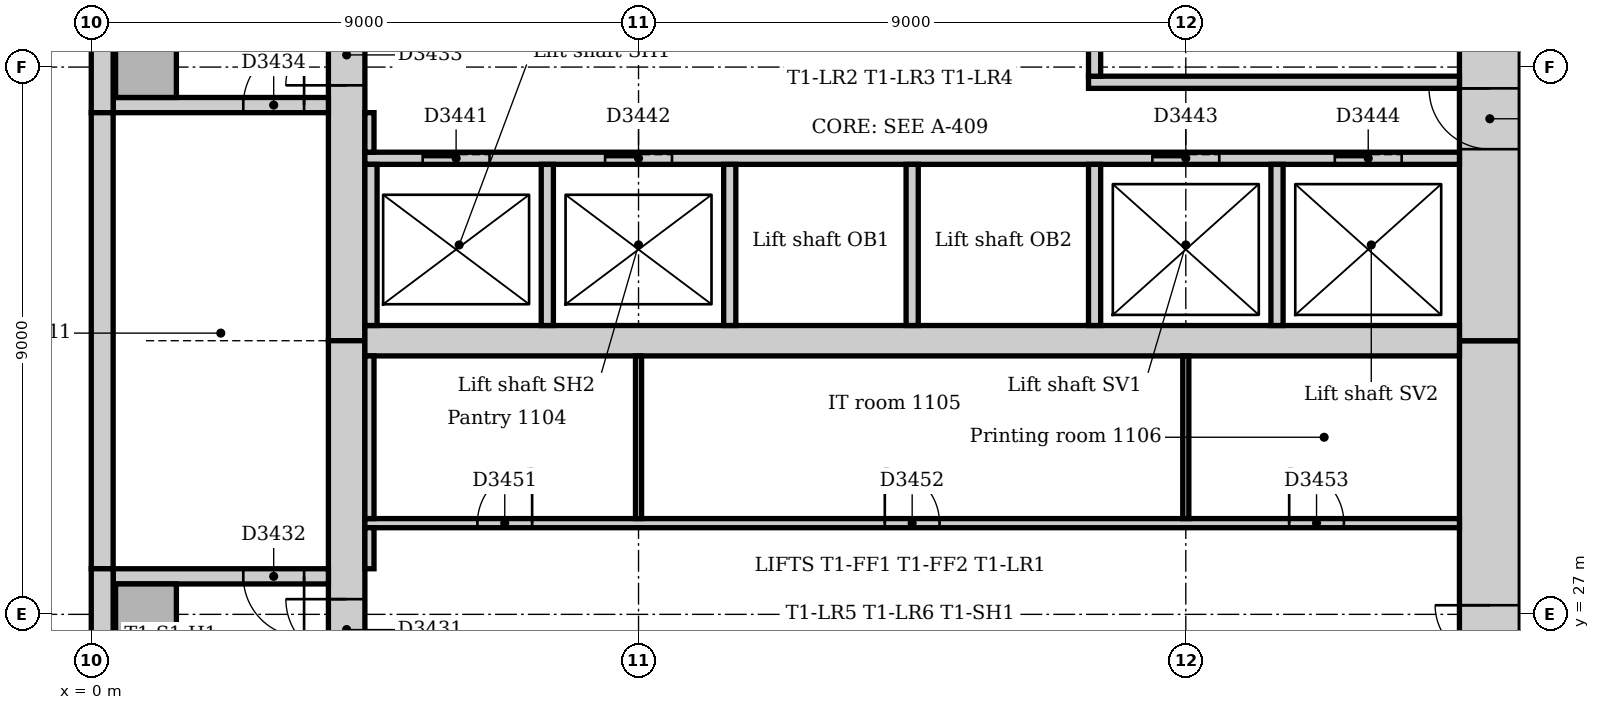
"""IFC4 building model, lengths in metres.
Left out: names, types, materials, properties, quantities, classifications, styles, units other than length and angle.
Written with IfcOpenShell. Run it as: python <this file> out.ifc"""

import sys

from ifc_helpers import new_model, si_unit, direction, frame, frame_2d, origin, origin_2d, place, context, subcontext, project, spatial, rectangle, extrude, element, fill, save


model = new_model("IFC4")
c1 = context("Model", 3, precision=1e-05, world=origin(), true_north=direction((0.0, 1.0)))
c2 = subcontext(c1, "Body", "Model", "MODEL_VIEW")
j1 = project(units=[si_unit("LENGTHUNIT", "METRE"), si_unit("PLANEANGLEUNIT", "RADIAN")], contexts=[c1])
p1 = place(None, origin())
s1 = spatial("IfcSite", under=j1, at=p1, CompositionType="ELEMENT")
p2 = place(p1, origin())
s2 = spatial("IfcBuilding", under=s1, at=p2, CompositionType="ELEMENT")
p3 = place(p2, frame((0.0, 0.0, 51.0)))
s3 = spatial("IfcBuildingStorey", under=s2, at=p3, CompositionType="ELEMENT", Elevation=51.0)
p4 = place(p3, frame((23.0, 21.0, 0.0), z_axis=(0.0, 0.0, 1.0), x_axis=(0.0, 1.0, 0.0)))
e1 = element("IfcWall", 1, at=p4, inside=s3, PredefinedType="SOLIDWALL", context=c2, shape_type="SweptSolid", body=[
    extrude(rectangle(XDim=10.5, YDim=1.0, at=frame_2d((5.25, 0.0))), origin(), (0.0, 0.0, 1.0), 4.0),
])
p5 = place(p4, frame((4.35, 0.0, 0.0)))
e2 = element("IfcOpeningElement", 2, at=p5, cuts=e1, PredefinedType="OPENING", context=c2, shape_type="SweptSolid", body=[
    extrude(rectangle(XDim=1.8, YDim=2.1, at=frame_2d((0.9, 1.05))), frame((0.0, 0.51, 0.0), z_axis=(0.0, -1.0, 0.0), x_axis=(1.0, 0.0, 0.0)), (0.0, 0.0, 1.0), 1.02),
])
p6 = place(p3, frame((23.0, 31.5, 0.0), z_axis=(0.0, 0.0, 1.0), x_axis=(0.0, 1.0, 0.0)))
e3 = element("IfcWall", 3, at=p6, inside=s3, PredefinedType="SOLIDWALL", context=c2, shape_type="SweptSolid", body=[
    extrude(rectangle(XDim=10.5, YDim=1.0, at=frame_2d((5.25, 0.0))), origin(), (0.0, 0.0, 1.0), 4.0),
])
p7 = place(p6, frame((3.15, 0.0, 0.0)))
e4 = element("IfcOpeningElement", 4, at=p7, cuts=e3, PredefinedType="OPENING", context=c2, shape_type="SweptSolid", body=[
    extrude(rectangle(XDim=1.0, YDim=2.1, at=frame_2d((0.5, 1.05))), frame((0.0, 0.51, 0.0), z_axis=(0.0, -1.0, 0.0), x_axis=(1.0, 0.0, 0.0)), (0.0, 0.0, 1.0), 1.02),
])
p8 = place(p6, frame((5.2, 0.0, 0.0)))
e5 = element("IfcOpeningElement", 5, at=p8, cuts=e3, PredefinedType="OPENING", context=c2, shape_type="SweptSolid", body=[
    extrude(rectangle(XDim=1.0, YDim=2.1, at=frame_2d((0.5, 1.05))), frame((0.0, 0.51, 0.0), z_axis=(0.0, -1.0, 0.0), x_axis=(1.0, 0.0, 0.0)), (0.0, 0.0, 1.0), 1.02),
])
p9 = place(p3, frame((4.2, 42.0, 0.0), z_axis=(0.0, 0.0, 1.0), x_axis=(0.0, -1.0, 0.0)))
e6 = element("IfcWall", 6, at=p9, inside=s3, PredefinedType="SOLIDWALL", context=c2, shape_type="SweptSolid", body=[
    extrude(rectangle(XDim=10.5, YDim=0.6, at=frame_2d((5.25, 0.0))), origin(), (0.0, 0.0, 1.0), 4.0),
])
p10 = place(p9, frame((5.3, 0.0, 0.0)))
e7 = element("IfcOpeningElement", 7, at=p10, cuts=e6, PredefinedType="OPENING", context=c2, shape_type="SweptSolid", body=[
    extrude(rectangle(XDim=1.0, YDim=2.1, at=frame_2d((0.5, 1.05))), frame((0.0, 0.31, 0.0), z_axis=(0.0, -1.0, 0.0), x_axis=(1.0, 0.0, 0.0)), (0.0, 0.0, 1.0), 0.62),
])
p11 = place(p3, frame((4.2, 31.5, 0.0), z_axis=(0.0, 0.0, 1.0), x_axis=(0.0, -1.0, 0.0)))
e8 = element("IfcWall", 8, at=p11, inside=s3, PredefinedType="SOLIDWALL", context=c2, shape_type="SweptSolid", body=[
    extrude(rectangle(XDim=10.5, YDim=0.6, at=frame_2d((5.25, 0.0))), origin(), (0.0, 0.0, 1.0), 4.0),
])
p12 = place(p11, frame((4.25, 0.0, 0.0)))
e9 = element("IfcOpeningElement", 9, at=p12, cuts=e8, PredefinedType="OPENING", context=c2, shape_type="SweptSolid", body=[
    extrude(rectangle(XDim=1.0, YDim=2.1, at=frame_2d((0.5, 1.05))), frame((0.0, 0.31, 0.0), z_axis=(0.0, -1.0, 0.0), x_axis=(1.0, 0.0, 0.0)), (0.0, 0.0, 1.0), 0.62),
])
p13 = place(p3, frame((4.5, 31.5, 0.0), z_axis=(0.0, 0.0, 1.0), x_axis=(1.0, 0.0, 0.0)))
e10 = element("IfcWall", 10, at=p13, inside=s3, PredefinedType="SOLIDWALL", context=c2, shape_type="SweptSolid", body=[
    extrude(rectangle(XDim=18.0, YDim=0.5, at=frame_2d((9.0, 0.0))), origin(), (0.0, 0.0, 1.0), 4.0),
])
p14 = place(p3, frame((3.9, 27.625, 0.0), z_axis=(0.0, 0.0, 1.0), x_axis=(-1.0, 0.0, 0.0)))
e11 = element("IfcWall", 11, at=p14, inside=s3, PredefinedType="SOLIDWALL", context=c2, shape_type="SweptSolid", body=[
    extrude(rectangle(XDim=3.54, YDim=0.25, at=frame_2d((1.77, 0.0))), origin(), (0.0, 0.0, 1.0), 4.0),
])
p15 = place(p14, frame((0.4, 0.0, 0.0)))
e12 = element("IfcOpeningElement", 12, at=p15, cuts=e11, PredefinedType="OPENING", context=c2, shape_type="SweptSolid", body=[
    extrude(rectangle(XDim=1.0, YDim=2.1, at=frame_2d((0.5, 1.05))), frame((0.0, 0.135, 0.0), z_axis=(0.0, -1.0, 0.0), x_axis=(1.0, 0.0, 0.0)), (0.0, 0.0, 1.0), 0.27),
])
p16 = place(p3, frame((0.36, 35.375, 0.0), z_axis=(0.0, 0.0, 1.0), x_axis=(1.0, 0.0, 0.0)))
e13 = element("IfcWall", 13, at=p16, inside=s3, PredefinedType="SOLIDWALL", context=c2, shape_type="SweptSolid", body=[
    extrude(rectangle(XDim=3.54, YDim=0.25, at=frame_2d((1.77, 0.0))), origin(), (0.0, 0.0, 1.0), 4.0),
])
p17 = place(p16, frame((2.14, 0.0, 0.0)))
e14 = element("IfcOpeningElement", 14, at=p17, cuts=e13, PredefinedType="OPENING", context=c2, shape_type="SweptSolid", body=[
    extrude(rectangle(XDim=1.0, YDim=2.1, at=frame_2d((0.5, 1.05))), frame((0.0, 0.135, 0.0), z_axis=(0.0, -1.0, 0.0), x_axis=(1.0, 0.0, 0.0)), (0.0, 0.0, 1.0), 0.27),
])
for number, where, z_axis, x_axis in (
    (15, (0.9, 27.0, 0.0), (0.0, 0.0, 1.0), (1.0, 0.0, 0.0)),
    (16, (0.9, 36.0, 0.0), (0.0, 0.0, 1.0), (1.0, 0.0, 0.0)),
):
    element("IfcColumn", number, at=place(p3, frame(where, z_axis=z_axis, x_axis=x_axis)), inside=s3, PredefinedType="COLUMN", context=c2, shape_type="SweptSolid", body=[
        extrude(rectangle(XDim=1.0, YDim=1.0, at=origin_2d()), origin(), (0.0, 0.0, 1.0), 4.0),
    ])
p18 = place(p3, frame((0.18, 40.757, 0.0), z_axis=(0.0, 0.0, 1.0), x_axis=(0.0, -1.0, 0.0)))
e17 = element("IfcWall", 17, at=p18, inside=s3, PredefinedType="STANDARD", context=c2, shape_type="SweptSolid", body=[
    extrude(rectangle(XDim=5.507, YDim=0.36, at=frame_2d((2.754, 0.0))), origin(), (0.0, 0.0, 1.0), 3.85),
])
p19 = place(p3, frame((0.18, 35.25, 0.0), z_axis=(0.0, 0.0, 1.0), x_axis=(0.0, -1.0, 0.0)))
e18 = element("IfcWall", 18, at=p19, inside=s3, PredefinedType="STANDARD", context=c2, shape_type="SweptSolid", body=[
    extrude(rectangle(XDim=7.5, YDim=0.36, at=frame_2d((3.75, 0.0))), origin(), (0.0, 0.0, 1.0), 3.85),
])
p20 = place(p3, frame((0.18, 27.75, 0.0), z_axis=(0.0, 0.0, 1.0), x_axis=(0.0, -1.0, 0.0)))
e19 = element("IfcWall", 19, at=p20, inside=s3, PredefinedType="STANDARD", context=c2, shape_type="SweptSolid", body=[
    extrude(rectangle(XDim=6.75, YDim=0.36, at=frame_2d((3.375, 0.0))), origin(), (0.0, 0.0, 1.0), 3.85),
])
p21 = place(p3, frame((16.4, 35.75, 0.0), z_axis=(0.0, 0.0, 1.0), x_axis=(1.0, 0.0, 0.0)))
e20 = element("IfcWall", 20, at=p21, inside=s3, PredefinedType="PARTITIONING", context=c2, shape_type="SweptSolid", body=[
    extrude(rectangle(XDim=6.1, YDim=0.2, at=frame_2d((3.05, 0.0))), origin(), (0.0, 0.0, 1.0), 3.85),
])
p22 = place(p3, frame((16.5, 35.85, 0.0), z_axis=(0.0, 0.0, 1.0), x_axis=(0.0, 1.0, 0.0)))
e21 = element("IfcWall", 21, at=p22, inside=s3, PredefinedType="PARTITIONING", context=c2, shape_type="SweptSolid", body=[
    extrude(rectangle(XDim=2.55, YDim=0.2, at=frame_2d((1.275, 0.0))), origin(), (0.0, 0.0, 1.0), 3.85),
])
p23 = place(p3, frame((4.5, 34.5, 0.0), z_axis=(0.0, 0.0, 1.0), x_axis=(1.0, 0.0, 0.0)))
e22 = element("IfcWall", 22, at=p23, inside=s3, PredefinedType="PARTITIONING", context=c2, shape_type="SweptSolid", body=[
    extrude(rectangle(XDim=18.0, YDim=0.2, at=frame_2d((9.0, 0.0))), origin(), (0.0, 0.0, 1.0), 3.85),
])
p24 = place(p23, frame((0.95, 0.0, 0.0)))
e23 = element("IfcOpeningElement", 23, at=p24, cuts=e22, PredefinedType="OPENING", context=c2, shape_type="SweptSolid", body=[
    extrude(rectangle(XDim=1.1, YDim=2.1, at=frame_2d((0.55, 1.05))), frame((0.0, 0.11, 0.0), z_axis=(0.0, -1.0, 0.0), x_axis=(1.0, 0.0, 0.0)), (0.0, 0.0, 1.0), 0.22),
])
p25 = place(p23, frame((3.95, 0.0, 0.0)))
e24 = element("IfcOpeningElement", 24, at=p25, cuts=e22, PredefinedType="OPENING", context=c2, shape_type="SweptSolid", body=[
    extrude(rectangle(XDim=1.1, YDim=2.1, at=frame_2d((0.55, 1.05))), frame((0.0, 0.11, 0.0), z_axis=(0.0, -1.0, 0.0), x_axis=(1.0, 0.0, 0.0)), (0.0, 0.0, 1.0), 0.22),
])
p26 = place(p23, frame((12.95, 0.0, 0.0)))
e25 = element("IfcOpeningElement", 25, at=p26, cuts=e22, PredefinedType="OPENING", context=c2, shape_type="SweptSolid", body=[
    extrude(rectangle(XDim=1.1, YDim=2.1, at=frame_2d((0.55, 1.05))), frame((0.0, 0.11, 0.0), z_axis=(0.0, -1.0, 0.0), x_axis=(1.0, 0.0, 0.0)), (0.0, 0.0, 1.0), 0.22),
])
p27 = place(p23, frame((15.95, 0.0, 0.0)))
e26 = element("IfcOpeningElement", 26, at=p27, cuts=e22, PredefinedType="OPENING", context=c2, shape_type="SweptSolid", body=[
    extrude(rectangle(XDim=1.1, YDim=2.1, at=frame_2d((0.55, 1.05))), frame((0.0, 0.11, 0.0), z_axis=(0.0, -1.0, 0.0), x_axis=(1.0, 0.0, 0.0)), (0.0, 0.0, 1.0), 0.22),
])
for number, where, z_axis, x_axis in (
    (27, (4.6, 31.75, 0.0), (0.0, 0.0, 1.0), (0.0, 1.0, 0.0)),
    (28, (7.5, 31.75, 0.0), (0.0, 0.0, 1.0), (0.0, 1.0, 0.0)),
    (29, (10.5, 31.75, 0.0), (0.0, 0.0, 1.0), (0.0, 1.0, 0.0)),
    (30, (13.5, 31.75, 0.0), (0.0, 0.0, 1.0), (0.0, 1.0, 0.0)),
    (31, (16.5, 31.75, 0.0), (0.0, 0.0, 1.0), (0.0, 1.0, 0.0)),
    (32, (19.5, 31.75, 0.0), (0.0, 0.0, 1.0), (0.0, 1.0, 0.0)),
):
    element("IfcWall", number, at=place(p3, frame(where, z_axis=z_axis, x_axis=x_axis)), inside=s3, PredefinedType="PARTITIONING", context=c2, shape_type="SweptSolid", body=[
        extrude(rectangle(XDim=2.65, YDim=0.2, at=frame_2d((1.325, 0.0))), origin(), (0.0, 0.0, 1.0), 3.85),
    ])
p28 = place(p3, frame((4.5, 28.5, 0.0), z_axis=(0.0, 0.0, 1.0), x_axis=(1.0, 0.0, 0.0)))
e33 = element("IfcWall", 33, at=p28, inside=s3, PredefinedType="PARTITIONING", context=c2, shape_type="SweptSolid", body=[
    extrude(rectangle(XDim=18.0, YDim=0.15, at=frame_2d((9.0, 0.0))), origin(), (0.0, 0.0, 1.0), 3.85),
])
p29 = place(p28, frame((1.85, 0.0, 0.0)))
e34 = element("IfcOpeningElement", 34, at=p29, cuts=e33, PredefinedType="OPENING", context=c2, shape_type="SweptSolid", body=[
    extrude(rectangle(XDim=0.9, YDim=2.1, at=frame_2d((0.45, 1.05))), frame((0.0, 0.085, 0.0), z_axis=(0.0, -1.0, 0.0), x_axis=(1.0, 0.0, 0.0)), (0.0, 0.0, 1.0), 0.17),
])
p30 = place(p28, frame((8.55, 0.0, 0.0)))
e35 = element("IfcOpeningElement", 35, at=p30, cuts=e33, PredefinedType="OPENING", context=c2, shape_type="SweptSolid", body=[
    extrude(rectangle(XDim=0.9, YDim=2.1, at=frame_2d((0.45, 1.05))), frame((0.0, 0.085, 0.0), z_axis=(0.0, -1.0, 0.0), x_axis=(1.0, 0.0, 0.0)), (0.0, 0.0, 1.0), 0.17),
])
p31 = place(p28, frame((15.2, 0.0, 0.0)))
e36 = element("IfcOpeningElement", 36, at=p31, cuts=e33, PredefinedType="OPENING", context=c2, shape_type="SweptSolid", body=[
    extrude(rectangle(XDim=0.9, YDim=2.1, at=frame_2d((0.45, 1.05))), frame((0.0, 0.085, 0.0), z_axis=(0.0, -1.0, 0.0), x_axis=(1.0, 0.0, 0.0)), (0.0, 0.0, 1.0), 0.17),
])
p32 = place(p3, frame((4.575, 27.75, 0.0), z_axis=(0.0, 0.0, 1.0), x_axis=(0.0, 1.0, 0.0)))
e37 = element("IfcWall", 37, at=p32, inside=s3, PredefinedType="PARTITIONING", context=c2, shape_type="SweptSolid", body=[
    extrude(rectangle(XDim=0.675, YDim=0.15, at=frame_2d((0.338, 0.0))), origin(), (0.0, 0.0, 1.0), 3.85),
])
p33 = place(p3, frame((4.575, 28.575, 0.0), z_axis=(0.0, 0.0, 1.0), x_axis=(0.0, 1.0, 0.0)))
e38 = element("IfcWall", 38, at=p33, inside=s3, PredefinedType="PARTITIONING", context=c2, shape_type="SweptSolid", body=[
    extrude(rectangle(XDim=2.675, YDim=0.15, at=frame_2d((1.337, 0.0))), origin(), (0.0, 0.0, 1.0), 3.85),
])
p34 = place(p3, frame((4.575, 34.6, 0.0), z_axis=(0.0, 0.0, 1.0), x_axis=(0.0, 1.0, 0.0)))
e39 = element("IfcWall", 39, at=p34, inside=s3, PredefinedType="PARTITIONING", context=c2, shape_type="SweptSolid", body=[
    extrude(rectangle(XDim=0.65, YDim=0.15, at=frame_2d((0.325, 0.0))), origin(), (0.0, 0.0, 1.0), 3.85),
])
for number, where, z_axis, x_axis in (
    (40, (9.0, 28.575, 0.0), (0.0, 0.0, 1.0), (0.0, 1.0, 0.0)),
    (41, (18.0, 28.575, 0.0), (0.0, 0.0, 1.0), (0.0, 1.0, 0.0)),
):
    element("IfcWall", number, at=place(p3, frame(where, z_axis=z_axis, x_axis=x_axis)), inside=s3, PredefinedType="PARTITIONING", context=c2, shape_type="SweptSolid", body=[
        extrude(rectangle(XDim=2.675, YDim=0.1, at=frame_2d((1.337, 0.0))), origin(), (0.0, 0.0, 1.0), 3.85),
    ])
p35 = place(p12, frame((1.0, 0.0, 0.0), z_axis=(0.0, 0.0, 1.0), x_axis=(-1.0, 0.0, 0.0)))
e42 = element("IfcDoor", 42, at=p35, inside=s3, OperationType="SINGLE_SWING_RIGHT", PredefinedType="DOOR", context=c2, shape_type="SweptSolid", body=[
    extrude(rectangle(XDim=1.0, YDim=2.1, at=frame_2d((0.5, 1.05))), frame((0.0, 0.025, 0.0), z_axis=(0.0, -1.0, 0.0), x_axis=(1.0, 0.0, 0.0)), (0.0, 0.0, 1.0), 0.05),
])
fill(e9, e42)
p36 = place(p15, origin())
e43 = element("IfcDoor", 43, at=p36, inside=s3, OperationType="SINGLE_SWING_LEFT", PredefinedType="DOOR", context=c2, shape_type="SweptSolid", body=[
    extrude(rectangle(XDim=1.0, YDim=2.1, at=frame_2d((0.5, 1.05))), frame((0.0, 0.025, 0.0), z_axis=(0.0, -1.0, 0.0), x_axis=(1.0, 0.0, 0.0)), (0.0, 0.0, 1.0), 0.05),
])
fill(e12, e43)
p37 = place(p10, frame((1.0, 0.0, 0.0), z_axis=(0.0, 0.0, 1.0), x_axis=(-1.0, 0.0, 0.0)))
e44 = element("IfcDoor", 44, at=p37, inside=s3, OperationType="SINGLE_SWING_LEFT", PredefinedType="DOOR", context=c2, shape_type="SweptSolid", body=[
    extrude(rectangle(XDim=1.0, YDim=2.1, at=frame_2d((0.5, 1.05))), frame((0.0, 0.025, 0.0), z_axis=(0.0, -1.0, 0.0), x_axis=(1.0, 0.0, 0.0)), (0.0, 0.0, 1.0), 0.05),
])
fill(e7, e44)
p38 = place(p17, origin())
e45 = element("IfcDoor", 45, at=p38, inside=s3, OperationType="SINGLE_SWING_RIGHT", PredefinedType="DOOR", context=c2, shape_type="SweptSolid", body=[
    extrude(rectangle(XDim=1.0, YDim=2.1, at=frame_2d((0.5, 1.05))), frame((0.0, 0.025, 0.0), z_axis=(0.0, -1.0, 0.0), x_axis=(1.0, 0.0, 0.0)), (0.0, 0.0, 1.0), 0.05),
])
fill(e14, e45)
p39 = place(p24, origin())
e46 = element("IfcDoor", 46, at=p39, inside=s3, OperationType="SLIDING_TO_LEFT", PredefinedType="DOOR", context=c2, shape_type="SweptSolid", body=[
    extrude(rectangle(XDim=1.1, YDim=2.1, at=frame_2d((0.55, 1.05))), frame((0.0, 0.025, 0.0), z_axis=(0.0, -1.0, 0.0), x_axis=(1.0, 0.0, 0.0)), (0.0, 0.0, 1.0), 0.05),
])
fill(e23, e46)
p40 = place(p25, origin())
e47 = element("IfcDoor", 47, at=p40, inside=s3, OperationType="SLIDING_TO_LEFT", PredefinedType="DOOR", context=c2, shape_type="SweptSolid", body=[
    extrude(rectangle(XDim=1.1, YDim=2.1, at=frame_2d((0.55, 1.05))), frame((0.0, 0.025, 0.0), z_axis=(0.0, -1.0, 0.0), x_axis=(1.0, 0.0, 0.0)), (0.0, 0.0, 1.0), 0.05),
])
fill(e24, e47)
p41 = place(p26, origin())
e48 = element("IfcDoor", 48, at=p41, inside=s3, OperationType="SLIDING_TO_LEFT", PredefinedType="DOOR", context=c2, shape_type="SweptSolid", body=[
    extrude(rectangle(XDim=1.1, YDim=2.1, at=frame_2d((0.55, 1.05))), frame((0.0, 0.025, 0.0), z_axis=(0.0, -1.0, 0.0), x_axis=(1.0, 0.0, 0.0)), (0.0, 0.0, 1.0), 0.05),
])
fill(e25, e48)
p42 = place(p27, origin())
e49 = element("IfcDoor", 49, at=p42, inside=s3, OperationType="SLIDING_TO_LEFT", PredefinedType="DOOR", context=c2, shape_type="SweptSolid", body=[
    extrude(rectangle(XDim=1.1, YDim=2.1, at=frame_2d((0.55, 1.05))), frame((0.0, 0.025, 0.0), z_axis=(0.0, -1.0, 0.0), x_axis=(1.0, 0.0, 0.0)), (0.0, 0.0, 1.0), 0.05),
])
fill(e26, e49)
p43 = place(p5, origin())
e50 = element("IfcDoor", 50, at=p43, inside=s3, OperationType="DOUBLE_DOOR_DOUBLE_SWING", PredefinedType="DOOR", context=c2, shape_type="SweptSolid", body=[
    extrude(rectangle(XDim=1.8, YDim=2.1, at=frame_2d((0.9, 1.05))), frame((0.0, 0.025, 0.0), z_axis=(0.0, -1.0, 0.0), x_axis=(1.0, 0.0, 0.0)), (0.0, 0.0, 1.0), 0.05),
])
fill(e2, e50)
p44 = place(p7, origin())
e51 = element("IfcDoor", 51, at=p44, inside=s3, OperationType="SINGLE_SWING_RIGHT", PredefinedType="DOOR", context=c2, shape_type="SweptSolid", body=[
    extrude(rectangle(XDim=1.0, YDim=2.1, at=frame_2d((0.5, 1.05))), frame((0.0, 0.025, 0.0), z_axis=(0.0, -1.0, 0.0), x_axis=(1.0, 0.0, 0.0)), (0.0, 0.0, 1.0), 0.05),
])
fill(e4, e51)
p45 = place(p29, origin())
e52 = element("IfcDoor", 52, at=p45, inside=s3, OperationType="SINGLE_SWING_RIGHT", PredefinedType="DOOR", context=c2, shape_type="SweptSolid", body=[
    extrude(rectangle(XDim=0.9, YDim=2.1, at=frame_2d((0.45, 1.05))), frame((0.0, 0.025, 0.0), z_axis=(0.0, -1.0, 0.0), x_axis=(1.0, 0.0, 0.0)), (0.0, 0.0, 1.0), 0.05),
])
fill(e34, e52)
p46 = place(p30, origin())
e53 = element("IfcDoor", 53, at=p46, inside=s3, OperationType="SINGLE_SWING_LEFT", PredefinedType="DOOR", context=c2, shape_type="SweptSolid", body=[
    extrude(rectangle(XDim=0.9, YDim=2.1, at=frame_2d((0.45, 1.05))), frame((0.0, 0.025, 0.0), z_axis=(0.0, -1.0, 0.0), x_axis=(1.0, 0.0, 0.0)), (0.0, 0.0, 1.0), 0.05),
])
fill(e35, e53)
p47 = place(p31, origin())
e54 = element("IfcDoor", 54, at=p47, inside=s3, OperationType="SINGLE_SWING_LEFT", PredefinedType="DOOR", context=c2, shape_type="SweptSolid", body=[
    extrude(rectangle(XDim=0.9, YDim=2.1, at=frame_2d((0.45, 1.05))), frame((0.0, 0.025, 0.0), z_axis=(0.0, -1.0, 0.0), x_axis=(1.0, 0.0, 0.0)), (0.0, 0.0, 1.0), 0.05),
])
fill(e36, e54)
save(model, sys.argv[1])
